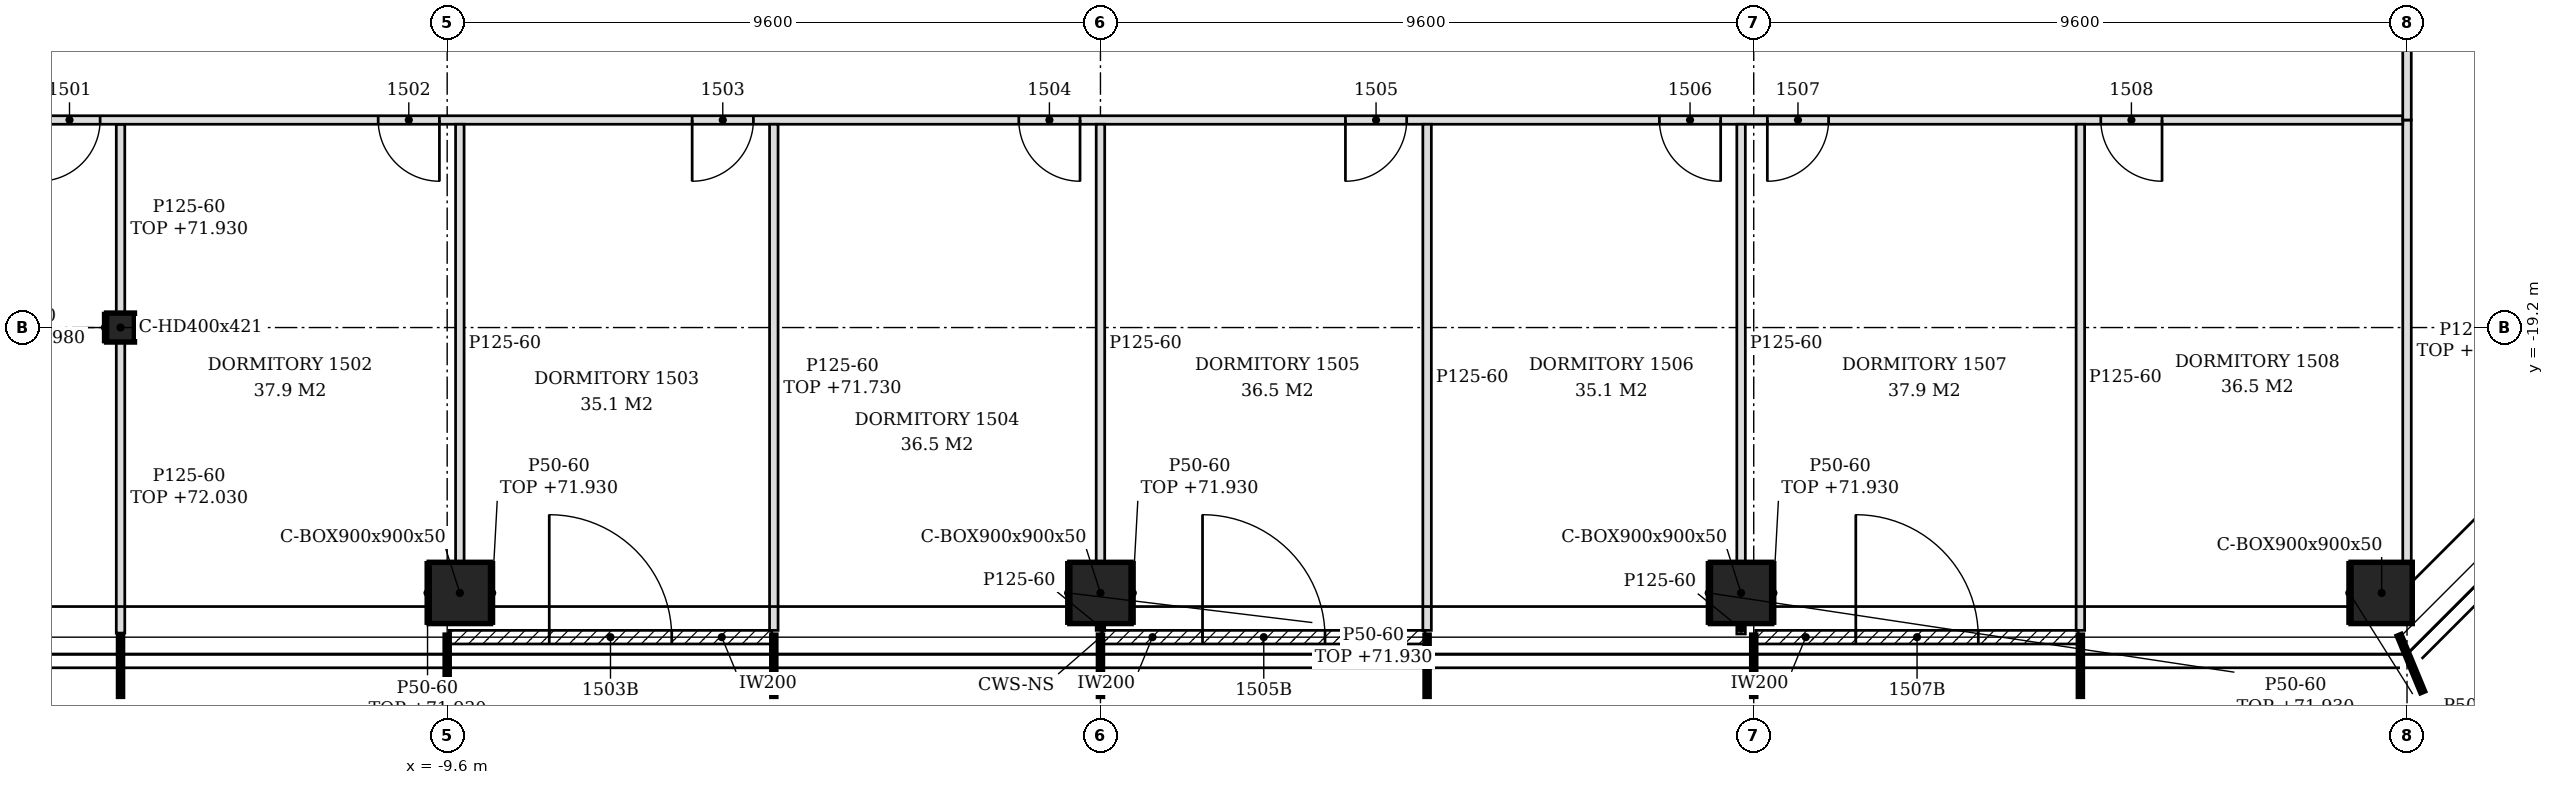
"""IFC4 building model, lengths in metres.
Left out: names, types, materials, properties, quantities, classifications, styles, units other than length and angle.
Written with IfcOpenShell. Run it as: python <this file> out.ifc"""

import sys

from ifc_helpers import new_model, si_unit, direction, frame, frame_2d, origin, origin_2d, place, context, subcontext, project, spatial, polyline, rectangle, hollow_rectangle, i_section, outline, extrude, element, fill, save


model = new_model("IFC4")
c1 = context("Model", 3, precision=1e-05, world=origin(), true_north=direction((0.0, 1.0)))
c2 = subcontext(c1, "Body", "Model", "MODEL_VIEW")
j1 = project(units=[si_unit("LENGTHUNIT", "METRE"), si_unit("PLANEANGLEUNIT", "RADIAN")], contexts=[c1])
p1 = place(None, origin())
s1 = spatial("IfcSite", under=j1, at=p1, CompositionType="ELEMENT")
p2 = place(p1, origin())
s2 = spatial("IfcBuilding", under=s1, at=p2, CompositionType="ELEMENT")
p3 = place(p2, frame((0.0, 0.0, 69.0)))
s3 = spatial("IfcBuildingStorey", under=s2, at=p3, CompositionType="ELEMENT", Elevation=69.0)
for number, where, z_axis, x_axis in (
    (1, (-9.414, -23.1, -0.15), (0.0, 0.0, 1.0), (1.0, 0.0, 0.0)),
    (2, (0.0, -23.1, -0.15), (0.0, 0.0, 1.0), (1.0, 0.0, 0.0)),
    (3, (9.414, -23.1, -0.15), (0.0, 0.0, 1.0), (1.0, 0.0, 0.0)),
    (4, (18.827, -23.1, -0.15), (0.0, 0.0, 1.0), (1.0, 0.0, 0.0)),
):
    element("IfcColumn", number, at=place(p3, frame(where, z_axis=z_axis, x_axis=x_axis)), inside=s3, PredefinedType="COLUMN", context=c2, shape_type="SweptSolid", body=[
        extrude(hollow_rectangle(XDim=0.9, YDim=0.9, WallThickness=0.05, at=origin_2d()), origin(), (0.0, 0.0, 1.0), 3.6),
    ])
p4 = place(p3, frame((-14.4, -19.2, -0.15), z_axis=(0.0, 0.0, 1.0), x_axis=(1.0, 0.0, 0.0)))
e5 = element("IfcColumn", 5, at=p4, inside=s3, PredefinedType="COLUMN", context=c2, shape_type="SweptSolid", body=[
    extrude(i_section(OverallWidth=0.409, OverallDepth=0.425, WebThickness=0.033, FlangeThickness=0.052, FilletRadius=0.015, at=origin_2d()), origin(), (0.0, 0.0, 1.0), 3.6),
])
p5 = place(p3, frame((-9.57, -23.75, 0.0), z_axis=(0.0, 0.0, 1.0), x_axis=(1.0, 0.0, 0.0)))
e6 = element("IfcWall", 6, at=p5, inside=s3, PredefinedType="NOTDEFINED", context=c2, shape_type="SweptSolid", body=[
    extrude(rectangle(XDim=4.74, YDim=0.2, at=frame_2d((2.37, 0.0))), origin(), (0.0, 0.0, 1.0), 3.45),
])
p6 = place(p5, frame((1.47, 0.0, 0.0)))
e7 = element("IfcOpeningElement", 7, at=p6, cuts=e6, PredefinedType="OPENING", context=c2, shape_type="SweptSolid", body=[
    extrude(rectangle(XDim=1.8, YDim=2.4, at=frame_2d((0.9, 1.2))), frame((0.0, 0.11, 0.0), z_axis=(0.0, -1.0, 0.0), x_axis=(1.0, 0.0, 0.0)), (0.0, 0.0, 1.0), 0.22),
])
p7 = place(p3, frame((0.03, -23.75, 0.0), z_axis=(0.0, 0.0, 1.0), x_axis=(1.0, 0.0, 0.0)))
e8 = element("IfcWall", 8, at=p7, inside=s3, PredefinedType="NOTDEFINED", context=c2, shape_type="SweptSolid", body=[
    extrude(rectangle(XDim=4.74, YDim=0.2, at=frame_2d((2.37, 0.0))), origin(), (0.0, 0.0, 1.0), 3.45),
])
p8 = place(p7, frame((1.47, 0.0, 0.0)))
e9 = element("IfcOpeningElement", 9, at=p8, cuts=e8, PredefinedType="OPENING", context=c2, shape_type="SweptSolid", body=[
    extrude(rectangle(XDim=1.8, YDim=2.4, at=frame_2d((0.9, 1.2))), frame((0.0, 0.11, 0.0), z_axis=(0.0, -1.0, 0.0), x_axis=(1.0, 0.0, 0.0)), (0.0, 0.0, 1.0), 0.22),
])
p9 = place(p3, frame((9.63, -23.75, 0.0), z_axis=(0.0, 0.0, 1.0), x_axis=(1.0, 0.0, 0.0)))
e10 = element("IfcWall", 10, at=p9, inside=s3, PredefinedType="NOTDEFINED", context=c2, shape_type="SweptSolid", body=[
    extrude(rectangle(XDim=4.74, YDim=0.2, at=frame_2d((2.37, 0.0))), origin(), (0.0, 0.0, 1.0), 3.45),
])
p10 = place(p9, frame((1.47, 0.0, 0.0)))
e11 = element("IfcOpeningElement", 11, at=p10, cuts=e10, PredefinedType="OPENING", context=c2, shape_type="SweptSolid", body=[
    extrude(rectangle(XDim=1.8, YDim=2.4, at=frame_2d((0.9, 1.2))), frame((0.0, 0.11, 0.0), z_axis=(0.0, -1.0, 0.0), x_axis=(1.0, 0.0, 0.0)), (0.0, 0.0, 1.0), 0.22),
])
p11 = place(p3, frame((-14.4, -23.69, 0.0), z_axis=(0.0, 0.0, 1.0), x_axis=(0.0, 1.0, 0.0)))
e12 = element("IfcWall", 12, at=p11, inside=s3, PredefinedType="PARTITIONING", context=c2, shape_type="SweptSolid", body=[
    extrude(outline(polyline([(0.0, 0.0), (4.277, 0.0), (4.278, 3.03), (0.74, 3.03), (0.738, 2.93), (0.44, 2.93), (0.438, 3.03), (0.0, 3.03), (0.0, 0.0)])), frame((0.0, 0.062, 0.0), z_axis=(0.0, -1.0, 0.0), x_axis=(1.0, 0.0, 0.0)), (0.0, 0.0, 1.0), 0.125),
])
p12 = place(p3, frame((-4.8, -23.65, 0.0), z_axis=(0.0, 0.0, 1.0), x_axis=(0.0, 1.0, 0.0)))
e13 = element("IfcWall", 13, at=p12, inside=s3, PredefinedType="PARTITIONING", context=c2, shape_type="SweptSolid", body=[
    extrude(rectangle(XDim=7.438, YDim=0.125, at=frame_2d((3.719, 0.0))), origin(), (0.0, 0.0, 1.0), 2.73),
])
p13 = place(p3, frame((0.0, -23.65, 0.0), z_axis=(0.0, 0.0, 1.0), x_axis=(0.0, 1.0, 0.0)))
e14 = element("IfcWall", 14, at=p13, inside=s3, PredefinedType="PARTITIONING", context=c2, shape_type="SweptSolid", body=[
    extrude(rectangle(XDim=0.1, YDim=0.125, at=frame_2d((0.05, 0.0))), origin(), (0.0, 0.0, 1.0), 3.45),
])
p14 = place(p3, frame((4.8, -23.65, 0.0), z_axis=(0.0, 0.0, 1.0), x_axis=(0.0, 1.0, 0.0)))
e15 = element("IfcWall", 15, at=p14, inside=s3, PredefinedType="PARTITIONING", context=c2, shape_type="SweptSolid", body=[
    extrude(outline(polyline([(0.0, 0.0), (7.438, 0.0), (7.438, 3.45), (4.555, 3.45), (4.553, 2.88), (4.345, 2.88), (4.343, 3.45), (0.7, 3.45), (0.698, 2.93), (0.4, 2.93), (0.398, 3.45), (0.0, 3.45), (0.0, 0.0)])), frame((0.0, 0.062, 0.0), z_axis=(0.0, -1.0, 0.0), x_axis=(1.0, 0.0, 0.0)), (0.0, 0.0, 1.0), 0.125),
])
p15 = place(p3, frame((9.414, -23.703, 0.0), z_axis=(0.0, 0.0, 1.0), x_axis=(0.0, 1.0, 0.0)))
e16 = element("IfcWall", 16, at=p15, inside=s3, PredefinedType="PARTITIONING", context=c2, shape_type="SweptSolid", body=[
    extrude(rectangle(XDim=0.153, YDim=0.125, at=frame_2d((0.076, 0.0))), origin(), (0.0, 0.0, 1.0), 3.45),
])
p16 = place(p3, frame((14.4, -23.65, 0.0), z_axis=(0.0, 0.0, 1.0), x_axis=(0.0, 1.0, 0.0)))
e17 = element("IfcWall", 17, at=p16, inside=s3, PredefinedType="PARTITIONING", context=c2, shape_type="SweptSolid", body=[
    extrude(outline(polyline([(0.0, 0.0), (7.438, 0.0), (7.438, 3.45), (4.555, 3.45), (4.553, 2.88), (4.345, 2.88), (4.343, 3.45), (0.7, 3.45), (0.698, 2.93), (0.4, 2.93), (0.398, 3.45), (0.0, 3.45), (0.0, 0.0)])), frame((0.0, 0.062, 0.0), z_axis=(0.0, -1.0, 0.0), x_axis=(1.0, 0.0, 0.0)), (0.0, 0.0, 1.0), 0.125),
])
p17 = place(p3, frame((0.0, -22.65, 0.0), z_axis=(0.0, 0.0, 1.0), x_axis=(0.0, 1.0, 0.0)))
e18 = element("IfcWall", 18, at=p17, inside=s3, PredefinedType="PARTITIONING", context=c2, shape_type="SweptSolid", body=[
    extrude(outline(polyline([(0.0, 0.0), (6.438, 0.0), (6.438, 3.45), (3.555, 3.45), (3.553, 2.88), (3.345, 2.88), (3.343, 3.45), (0.0, 3.45), (0.0, 0.0)])), frame((0.0, 0.062, 0.0), z_axis=(0.0, -1.0, 0.0), x_axis=(1.0, 0.0, 0.0)), (0.0, 0.0, 1.0), 0.125),
])
p18 = place(p3, frame((-9.414, -22.65, 0.0), z_axis=(0.0, 0.0, 1.0), x_axis=(0.0, 1.0, 0.0)))
e19 = element("IfcWall", 19, at=p18, inside=s3, PredefinedType="PARTITIONING", context=c2, shape_type="SweptSolid", body=[
    extrude(outline(polyline([(0.0, 0.0), (6.438, 0.0), (6.438, 3.45), (3.55, 3.45), (3.548, 2.93), (3.35, 2.93), (3.348, 3.45), (0.0, 3.45), (0.0, 0.0)])), frame((0.0, 0.062, 0.0), z_axis=(0.0, -1.0, 0.0), x_axis=(1.0, 0.0, 0.0)), (0.0, 0.0, 1.0), 0.125),
])
p19 = place(p3, frame((9.414, -22.65, 0.0), z_axis=(0.0, 0.0, 1.0), x_axis=(0.0, 1.0, 0.0)))
e20 = element("IfcWall", 20, at=p19, inside=s3, PredefinedType="PARTITIONING", context=c2, shape_type="SweptSolid", body=[
    extrude(outline(polyline([(0.0, 0.0), (6.438, 0.0), (6.438, 3.45), (3.555, 3.45), (3.553, 2.88), (3.345, 2.88), (3.343, 3.45), (0.0, 3.45), (0.0, 0.0)])), frame((0.0, 0.062, 0.0), z_axis=(0.0, -1.0, 0.0), x_axis=(1.0, 0.0, 0.0)), (0.0, 0.0, 1.0), 0.125),
])
p20 = place(p3, frame((19.2, -22.65, 0.0), z_axis=(0.0, 0.0, 1.0), x_axis=(0.0, 1.0, 0.0)))
e21 = element("IfcWall", 21, at=p20, inside=s3, PredefinedType="PARTITIONING", context=c2, shape_type="SweptSolid", body=[
    extrude(outline(polyline([(0.0, 0.0), (6.5, 0.0), (6.5, 2.73), (0.48, 2.73), (0.478, 2.63), (0.0, 2.63), (0.0, 0.0)])), frame((0.0, 0.062, 0.0), z_axis=(0.0, -1.0, 0.0), x_axis=(1.0, 0.0, 0.0)), (0.0, 0.0, 1.0), 0.125),
])
p21 = place(p3, frame((-14.4, -18.988, 0.0), z_axis=(0.0, 0.0, 1.0), x_axis=(0.0, 1.0, 0.0)))
e22 = element("IfcWall", 22, at=p21, inside=s3, PredefinedType="PARTITIONING", context=c2, shape_type="SweptSolid", body=[
    extrude(rectangle(XDim=2.775, YDim=0.125, at=frame_2d((1.388, 0.0))), origin(), (0.0, 0.0, 1.0), 2.93),
])
p22 = place(p3, frame((-22.55, -16.15, 0.0), z_axis=(0.0, 0.0, 1.0), x_axis=(1.0, 0.0, 0.0)))
e23 = element("IfcWall", 23, at=p22, inside=s3, PredefinedType="PARTITIONING", context=c2, shape_type="SweptSolid", body=[
    extrude(outline(polyline([(0.0, 0.0), (41.688, 0.0), (41.688, 2.73), (41.6, 2.73), (41.598, 3.45), (29.9, 3.45), (29.898, 2.73), (29.6, 2.73), (29.598, 3.45), (17.9, 3.45), (17.898, 2.73), (17.6, 2.73), (17.598, 3.45), (8.3, 3.45), (8.298, 2.93), (8.0, 2.93), (7.998, 3.45), (0.0, 3.45), (0.0, 0.0)])), frame((0.0, 0.062, 0.0), z_axis=(0.0, -1.0, 0.0), x_axis=(1.0, 0.0, 0.0)), (0.0, 0.0, 1.0), 0.125),
])
p23 = place(p22, frame((6.95, 0.0, 0.0)))
e24 = element("IfcOpeningElement", 24, at=p23, cuts=e23, PredefinedType="OPENING", context=c2, shape_type="SweptSolid", body=[
    extrude(rectangle(XDim=0.9, YDim=2.1, at=frame_2d((0.45, 1.05))), frame((0.0, 0.073, 0.0), z_axis=(0.0, -1.0, 0.0), x_axis=(1.0, 0.0, 0.0)), (0.0, 0.0, 1.0), 0.145),
])
p24 = place(p22, frame((11.936, 0.0, 0.0)))
e25 = element("IfcOpeningElement", 25, at=p24, cuts=e23, PredefinedType="OPENING", context=c2, shape_type="SweptSolid", body=[
    extrude(rectangle(XDim=0.9, YDim=2.1, at=frame_2d((0.45, 1.05))), frame((0.0, 0.073, 0.0), z_axis=(0.0, -1.0, 0.0), x_axis=(1.0, 0.0, 0.0)), (0.0, 0.0, 1.0), 0.145),
])
p25 = place(p22, frame((16.55, 0.0, 0.0)))
e26 = element("IfcOpeningElement", 26, at=p25, cuts=e23, PredefinedType="OPENING", context=c2, shape_type="SweptSolid", body=[
    extrude(rectangle(XDim=0.9, YDim=2.1, at=frame_2d((0.45, 1.05))), frame((0.0, 0.073, 0.0), z_axis=(0.0, -1.0, 0.0), x_axis=(1.0, 0.0, 0.0)), (0.0, 0.0, 1.0), 0.145),
])
p26 = place(p22, frame((21.35, 0.0, 0.0)))
e27 = element("IfcOpeningElement", 27, at=p26, cuts=e23, PredefinedType="OPENING", context=c2, shape_type="SweptSolid", body=[
    extrude(rectangle(XDim=0.9, YDim=2.1, at=frame_2d((0.45, 1.05))), frame((0.0, 0.073, 0.0), z_axis=(0.0, -1.0, 0.0), x_axis=(1.0, 0.0, 0.0)), (0.0, 0.0, 1.0), 0.145),
])
p27 = place(p22, frame((26.15, 0.0, 0.0)))
e28 = element("IfcOpeningElement", 28, at=p27, cuts=e23, PredefinedType="OPENING", context=c2, shape_type="SweptSolid", body=[
    extrude(rectangle(XDim=0.9, YDim=2.1, at=frame_2d((0.45, 1.05))), frame((0.0, 0.073, 0.0), z_axis=(0.0, -1.0, 0.0), x_axis=(1.0, 0.0, 0.0)), (0.0, 0.0, 1.0), 0.145),
])
p28 = place(p22, frame((30.764, 0.0, 0.0)))
e29 = element("IfcOpeningElement", 29, at=p28, cuts=e23, PredefinedType="OPENING", context=c2, shape_type="SweptSolid", body=[
    extrude(rectangle(XDim=0.9, YDim=2.1, at=frame_2d((0.45, 1.05))), frame((0.0, 0.073, 0.0), z_axis=(0.0, -1.0, 0.0), x_axis=(1.0, 0.0, 0.0)), (0.0, 0.0, 1.0), 0.145),
])
p29 = place(p22, frame((32.35, 0.0, 0.0)))
e30 = element("IfcOpeningElement", 30, at=p29, cuts=e23, PredefinedType="OPENING", context=c2, shape_type="SweptSolid", body=[
    extrude(rectangle(XDim=0.9, YDim=2.1, at=frame_2d((0.45, 1.05))), frame((0.0, 0.073, 0.0), z_axis=(0.0, -1.0, 0.0), x_axis=(1.0, 0.0, 0.0)), (0.0, 0.0, 1.0), 0.145),
])
p30 = place(p22, frame((37.25, 0.0, 0.0)))
e31 = element("IfcOpeningElement", 31, at=p30, cuts=e23, PredefinedType="OPENING", context=c2, shape_type="SweptSolid", body=[
    extrude(rectangle(XDim=0.9, YDim=2.1, at=frame_2d((0.45, 1.05))), frame((0.0, 0.073, 0.0), z_axis=(0.0, -1.0, 0.0), x_axis=(1.0, 0.0, 0.0)), (0.0, 0.0, 1.0), 0.145),
])
p31 = place(p3, frame((19.2, -16.15, 0.0), z_axis=(0.0, 0.0, 1.0), x_axis=(0.0, 1.0, 0.0)))
e32 = element("IfcWall", 32, at=p31, inside=s3, PredefinedType="PARTITIONING", context=c2, shape_type="SweptSolid", body=[
    extrude(rectangle(XDim=7.513, YDim=0.125, at=frame_2d((3.756, 0.0))), origin(), (0.0, 0.0, 1.0), 2.73),
])
p32 = place(p31, frame((5.35, 0.0, 0.0)))
e33 = element("IfcOpeningElement", 33, at=p32, cuts=e32, PredefinedType="OPENING", context=c2, shape_type="SweptSolid", body=[
    extrude(rectangle(XDim=0.9, YDim=2.1, at=frame_2d((0.45, 1.05))), frame((0.0, 0.073, 0.0), z_axis=(0.0, -1.0, 0.0), x_axis=(1.0, 0.0, 0.0)), (0.0, 0.0, 1.0), 0.145),
])
p33 = place(p3, frame((-14.629, -19.413, 0.0), z_axis=(0.0, 0.0, 1.0), x_axis=(0.0, 1.0, 0.0)))
e34 = element("IfcWall", 34, at=p33, inside=s3, PredefinedType="PARTITIONING", context=c2, shape_type="SweptSolid", body=[
    extrude(rectangle(XDim=0.425, YDim=0.05, at=frame_2d((0.212, 0.0))), origin(), (0.0, 0.0, 1.0), 2.98),
])
for number, where, z_axis, x_axis in (
    (35, (-0.475, -23.55, 0.0), (0.0, 0.0, 1.0), (0.0, 1.0, 0.0)),
    (36, (0.475, -23.55, 0.0), (0.0, 0.0, 1.0), (0.0, 1.0, 0.0)),
    (37, (8.939, -23.55, 0.0), (0.0, 0.0, 1.0), (0.0, 1.0, 0.0)),
    (38, (9.889, -23.55, 0.0), (0.0, 0.0, 1.0), (0.0, 1.0, 0.0)),
    (39, (-9.889, -23.55, 0.0), (0.0, 0.0, 1.0), (0.0, 1.0, 0.0)),
    (40, (-8.939, -23.55, 0.0), (0.0, 0.0, 1.0), (0.0, 1.0, 0.0)),
    (41, (18.352, -23.55, 0.0), (0.0, 0.0, 1.0), (0.0, 1.0, 0.0)),
):
    element("IfcWall", number, at=place(p3, frame(where, z_axis=z_axis, x_axis=x_axis)), inside=s3, PredefinedType="PARTITIONING", context=c2, shape_type="SweptSolid", body=[
        extrude(rectangle(XDim=0.9, YDim=0.05, at=frame_2d((0.45, 0.0))), origin(), (0.0, 0.0, 1.0), 2.93),
    ])
p34 = place(p6, origin())
e42 = element("IfcDoor", 42, at=p34, inside=s3, OperationType="SINGLE_SWING_LEFT", PredefinedType="DOOR", context=c2, shape_type="SweptSolid", body=[
    extrude(rectangle(XDim=1.8, YDim=2.4, at=frame_2d((0.9, 1.2))), frame((0.0, 0.025, 0.0), z_axis=(0.0, -1.0, 0.0), x_axis=(1.0, 0.0, 0.0)), (0.0, 0.0, 1.0), 0.05),
])
fill(e7, e42)
p35 = place(p8, origin())
e43 = element("IfcDoor", 43, at=p35, inside=s3, OperationType="SINGLE_SWING_LEFT", PredefinedType="DOOR", context=c2, shape_type="SweptSolid", body=[
    extrude(rectangle(XDim=1.8, YDim=2.4, at=frame_2d((0.9, 1.2))), frame((0.0, 0.025, 0.0), z_axis=(0.0, -1.0, 0.0), x_axis=(1.0, 0.0, 0.0)), (0.0, 0.0, 1.0), 0.05),
])
fill(e9, e43)
p36 = place(p10, origin())
e44 = element("IfcDoor", 44, at=p36, inside=s3, OperationType="SINGLE_SWING_LEFT", PredefinedType="DOOR", context=c2, shape_type="SweptSolid", body=[
    extrude(rectangle(XDim=1.8, YDim=2.4, at=frame_2d((0.9, 1.2))), frame((0.0, 0.025, 0.0), z_axis=(0.0, -1.0, 0.0), x_axis=(1.0, 0.0, 0.0)), (0.0, 0.0, 1.0), 0.05),
])
fill(e11, e44)
p37 = place(p23, frame((0.9, 0.0, 0.0), z_axis=(0.0, 0.0, 1.0), x_axis=(-1.0, 0.0, 0.0)))
e45 = element("IfcDoor", 45, at=p37, inside=s3, OperationType="SINGLE_SWING_RIGHT", PredefinedType="DOOR", context=c2, shape_type="SweptSolid", body=[
    extrude(rectangle(XDim=0.9, YDim=2.1, at=frame_2d((0.45, 1.05))), frame((0.0, 0.025, 0.0), z_axis=(0.0, -1.0, 0.0), x_axis=(1.0, 0.0, 0.0)), (0.0, 0.0, 1.0), 0.05),
])
fill(e24, e45)
p38 = place(p24, frame((0.9, 0.0, 0.0), z_axis=(0.0, 0.0, 1.0), x_axis=(-1.0, 0.0, 0.0)))
e46 = element("IfcDoor", 46, at=p38, inside=s3, OperationType="SINGLE_SWING_LEFT", PredefinedType="DOOR", context=c2, shape_type="SweptSolid", body=[
    extrude(rectangle(XDim=0.9, YDim=2.1, at=frame_2d((0.45, 1.05))), frame((0.0, 0.025, 0.0), z_axis=(0.0, -1.0, 0.0), x_axis=(1.0, 0.0, 0.0)), (0.0, 0.0, 1.0), 0.05),
])
fill(e25, e46)
p39 = place(p25, frame((0.9, 0.0, 0.0), z_axis=(0.0, 0.0, 1.0), x_axis=(-1.0, 0.0, 0.0)))
e47 = element("IfcDoor", 47, at=p39, inside=s3, OperationType="SINGLE_SWING_RIGHT", PredefinedType="DOOR", context=c2, shape_type="SweptSolid", body=[
    extrude(rectangle(XDim=0.9, YDim=2.1, at=frame_2d((0.45, 1.05))), frame((0.0, 0.025, 0.0), z_axis=(0.0, -1.0, 0.0), x_axis=(1.0, 0.0, 0.0)), (0.0, 0.0, 1.0), 0.05),
])
fill(e26, e47)
p40 = place(p26, frame((0.9, 0.0, 0.0), z_axis=(0.0, 0.0, 1.0), x_axis=(-1.0, 0.0, 0.0)))
e48 = element("IfcDoor", 48, at=p40, inside=s3, OperationType="SINGLE_SWING_LEFT", PredefinedType="DOOR", context=c2, shape_type="SweptSolid", body=[
    extrude(rectangle(XDim=0.9, YDim=2.1, at=frame_2d((0.45, 1.05))), frame((0.0, 0.025, 0.0), z_axis=(0.0, -1.0, 0.0), x_axis=(1.0, 0.0, 0.0)), (0.0, 0.0, 1.0), 0.05),
])
fill(e27, e48)
p41 = place(p27, frame((0.9, 0.0, 0.0), z_axis=(0.0, 0.0, 1.0), x_axis=(-1.0, 0.0, 0.0)))
e49 = element("IfcDoor", 49, at=p41, inside=s3, OperationType="SINGLE_SWING_RIGHT", PredefinedType="DOOR", context=c2, shape_type="SweptSolid", body=[
    extrude(rectangle(XDim=0.9, YDim=2.1, at=frame_2d((0.45, 1.05))), frame((0.0, 0.025, 0.0), z_axis=(0.0, -1.0, 0.0), x_axis=(1.0, 0.0, 0.0)), (0.0, 0.0, 1.0), 0.05),
])
fill(e28, e49)
p42 = place(p28, frame((0.9, 0.0, 0.0), z_axis=(0.0, 0.0, 1.0), x_axis=(-1.0, 0.0, 0.0)))
e50 = element("IfcDoor", 50, at=p42, inside=s3, OperationType="SINGLE_SWING_LEFT", PredefinedType="DOOR", context=c2, shape_type="SweptSolid", body=[
    extrude(rectangle(XDim=0.9, YDim=2.1, at=frame_2d((0.45, 1.05))), frame((0.0, 0.025, 0.0), z_axis=(0.0, -1.0, 0.0), x_axis=(1.0, 0.0, 0.0)), (0.0, 0.0, 1.0), 0.05),
])
fill(e29, e50)
p43 = place(p29, frame((0.9, 0.0, 0.0), z_axis=(0.0, 0.0, 1.0), x_axis=(-1.0, 0.0, 0.0)))
e51 = element("IfcDoor", 51, at=p43, inside=s3, OperationType="SINGLE_SWING_RIGHT", PredefinedType="DOOR", context=c2, shape_type="SweptSolid", body=[
    extrude(rectangle(XDim=0.9, YDim=2.1, at=frame_2d((0.45, 1.05))), frame((0.0, 0.025, 0.0), z_axis=(0.0, -1.0, 0.0), x_axis=(1.0, 0.0, 0.0)), (0.0, 0.0, 1.0), 0.05),
])
fill(e30, e51)
p44 = place(p30, frame((0.9, 0.0, 0.0), z_axis=(0.0, 0.0, 1.0), x_axis=(-1.0, 0.0, 0.0)))
e52 = element("IfcDoor", 52, at=p44, inside=s3, OperationType="SINGLE_SWING_LEFT", PredefinedType="DOOR", context=c2, shape_type="SweptSolid", body=[
    extrude(rectangle(XDim=0.9, YDim=2.1, at=frame_2d((0.45, 1.05))), frame((0.0, 0.025, 0.0), z_axis=(0.0, -1.0, 0.0), x_axis=(1.0, 0.0, 0.0)), (0.0, 0.0, 1.0), 0.05),
])
fill(e31, e52)
save(model, sys.argv[1])
